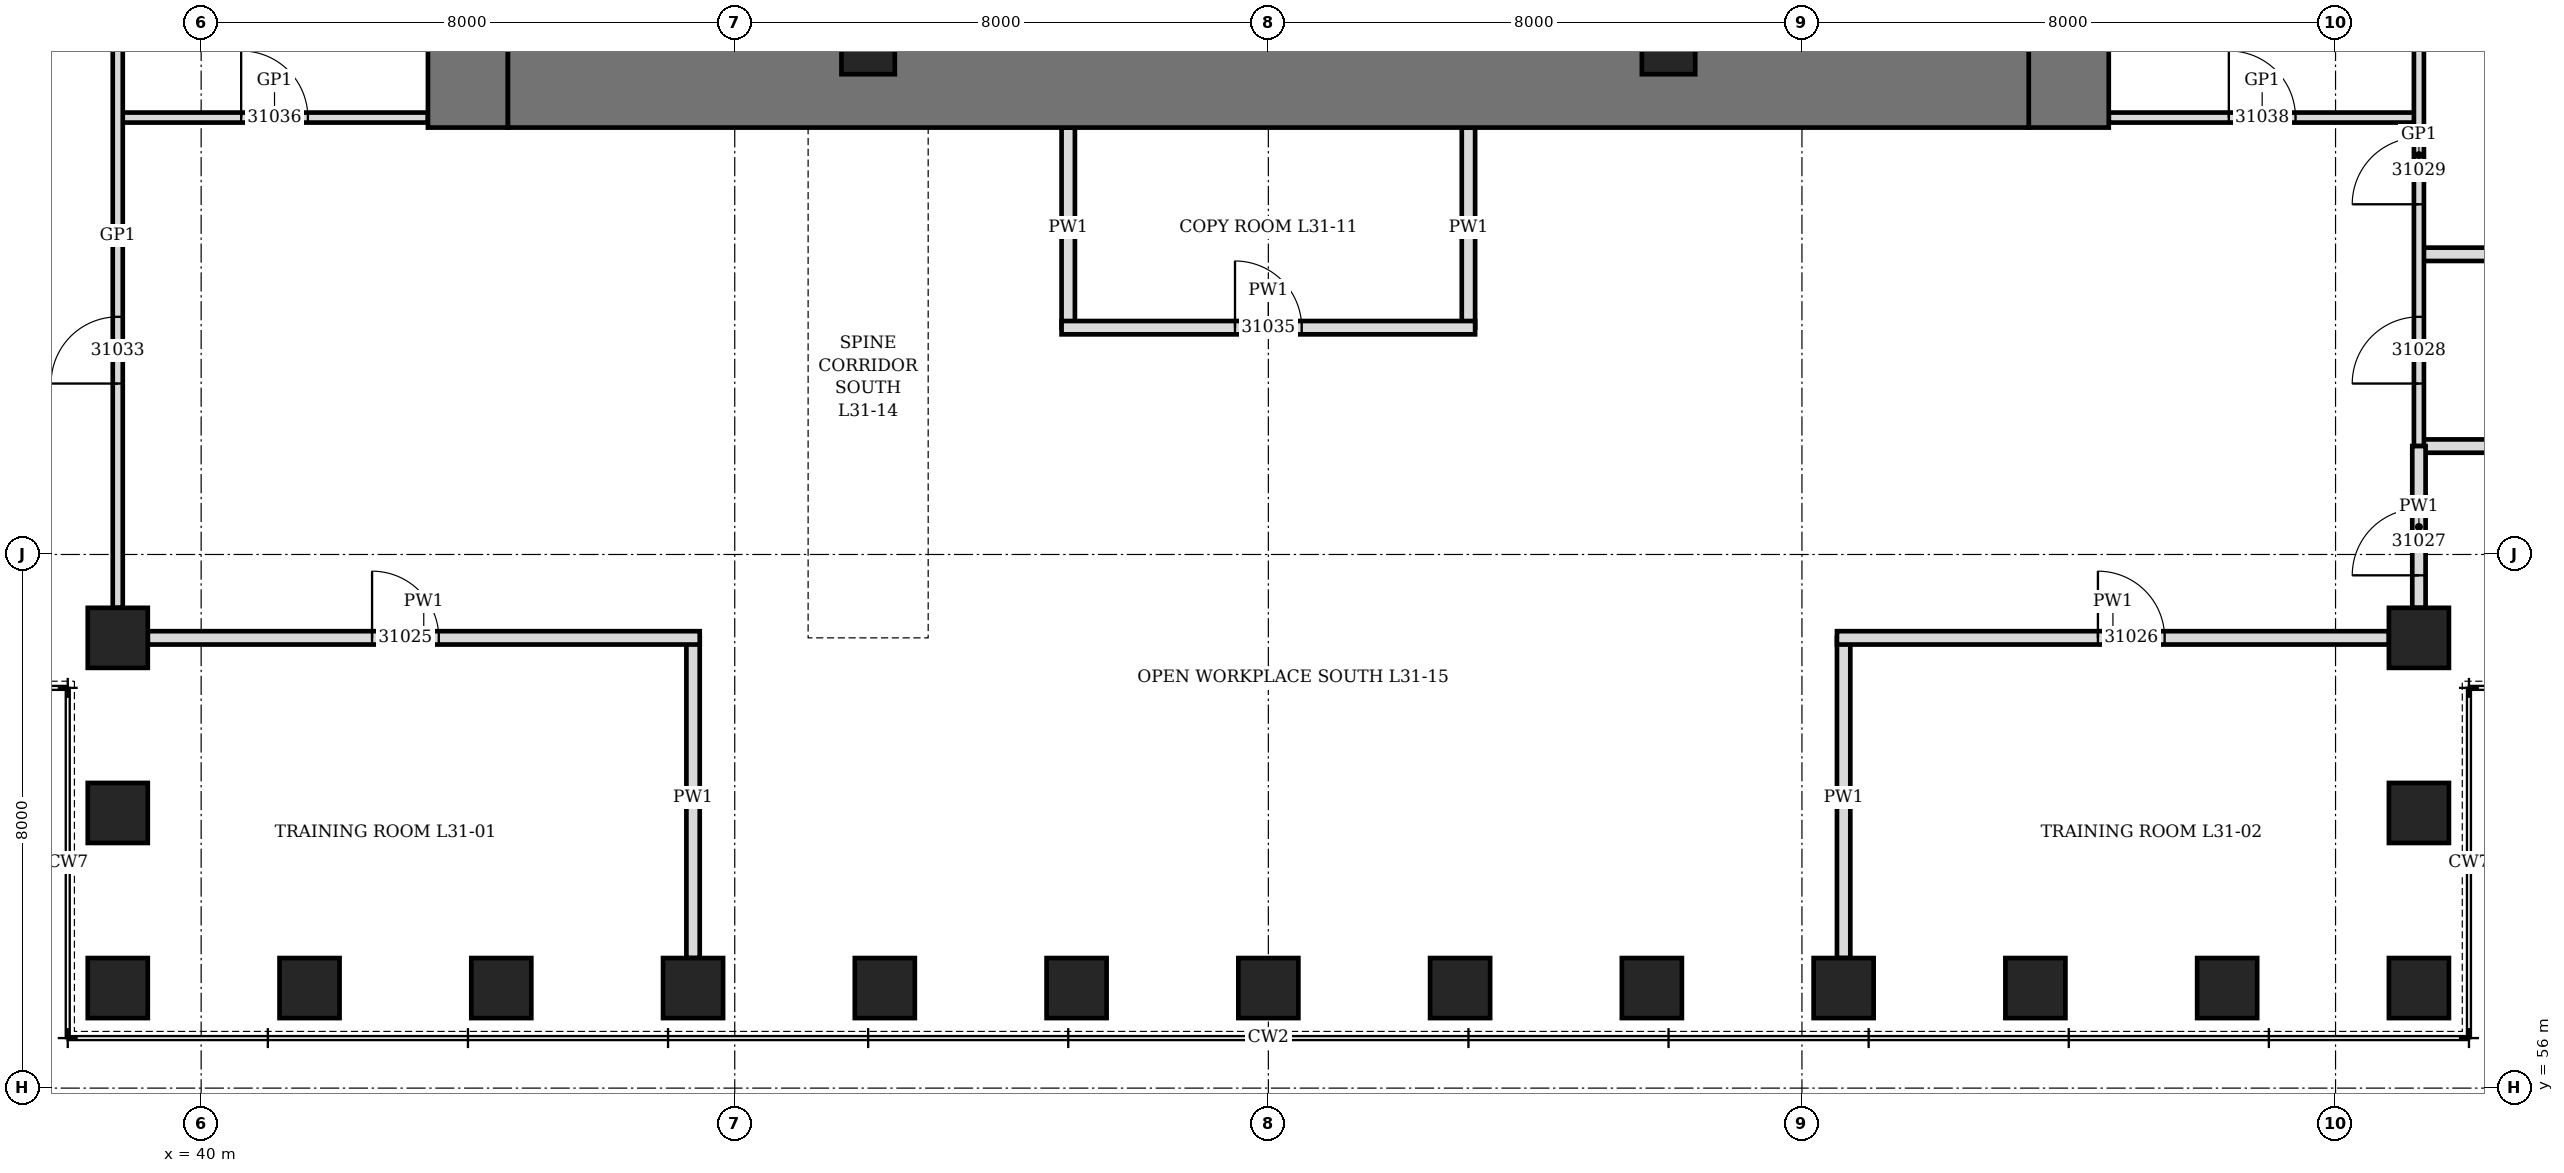
"""IFC4 building model, lengths in metres.
Left out: names, types, materials, properties, quantities, classifications, styles, units other than length and angle.
Written with IfcOpenShell. Run it as: python <this file> out.ifc"""

import sys

from ifc_helpers import new_model, si_unit, direction, frame, frame_2d, origin, origin_2d, place, context, subcontext, project, spatial, rectangle, hollow_rectangle, extrude, element, fill, save


model = new_model("IFC4")
c1 = context("Model", 3, precision=1e-05, world=origin(), true_north=direction((0.0, 1.0)))
c2 = subcontext(c1, "Body", "Model", "MODEL_VIEW")
j1 = project(units=[si_unit("LENGTHUNIT", "METRE"), si_unit("PLANEANGLEUNIT", "RADIAN")], contexts=[c1])
p1 = place(None, origin())
s1 = spatial("IfcSite", under=j1, at=p1, CompositionType="ELEMENT")
p2 = place(p1, origin())
s2 = spatial("IfcBuilding", under=s1, at=p2, CompositionType="ELEMENT")
p3 = place(p2, frame((0.0, 0.0, 141.7)))
s3 = spatial("IfcBuildingStorey", under=s2, at=p3, CompositionType="ELEMENT", Elevation=141.7)
for number, where, z_axis, x_axis in (
    (1, (38.75, 57.5, 0.0), (0.0, 0.0, 1.0), (1.0, 0.0, 0.0)),
    (2, (41.625, 57.5, 0.0), (0.0, 0.0, 1.0), (1.0, 0.0, 0.0)),
    (3, (44.5, 57.5, 0.0), (0.0, 0.0, 1.0), (1.0, 0.0, 0.0)),
    (4, (47.375, 57.5, 0.0), (0.0, 0.0, 1.0), (1.0, 0.0, 0.0)),
    (5, (50.25, 57.5, 0.0), (0.0, 0.0, 1.0), (1.0, 0.0, 0.0)),
    (6, (53.125, 57.5, 0.0), (0.0, 0.0, 1.0), (1.0, 0.0, 0.0)),
    (7, (56.0, 57.5, 0.0), (0.0, 0.0, 1.0), (1.0, 0.0, 0.0)),
    (8, (58.875, 57.5, 0.0), (0.0, 0.0, 1.0), (1.0, 0.0, 0.0)),
    (9, (61.75, 57.5, 0.0), (0.0, 0.0, 1.0), (1.0, 0.0, 0.0)),
    (10, (64.625, 57.5, 0.0), (0.0, 0.0, 1.0), (1.0, 0.0, 0.0)),
    (11, (67.5, 57.5, 0.0), (0.0, 0.0, 1.0), (1.0, 0.0, 0.0)),
    (12, (70.375, 57.5, 0.0), (0.0, 0.0, 1.0), (1.0, 0.0, 0.0)),
    (13, (73.25, 57.5, 0.0), (0.0, 0.0, 1.0), (0.0, 1.0, 0.0)),
    (14, (73.25, 60.125, 0.0), (0.0, 0.0, 1.0), (0.0, 1.0, 0.0)),
    (15, (73.25, 62.75, 0.0), (0.0, 0.0, 1.0), (1.0, 0.0, 0.0)),
    (16, (38.75, 62.75, 0.0), (0.0, 0.0, 1.0), (0.0, 1.0, 0.0)),
    (17, (38.75, 60.125, 0.0), (0.0, 0.0, 1.0), (0.0, 1.0, 0.0)),
):
    element("IfcColumn", number, at=place(p3, frame(where, z_axis=z_axis, x_axis=x_axis)), inside=s3, PredefinedType="COLUMN", context=c2, shape_type="SweptSolid", body=[
        extrude(hollow_rectangle(XDim=0.9, YDim=0.9, WallThickness=0.12, at=origin_2d()), origin(), (0.0, 0.0, 1.0), 4.2),
    ])
p4 = place(p3, frame((44.0, 70.4, 0.0), z_axis=(0.0, 0.0, 1.0), x_axis=(0.0, 1.0, 0.0)))
e18 = element("IfcWall", 18, at=p4, inside=s3, PredefinedType="SHEAR", context=c2, shape_type="SweptSolid", body=[
    extrude(rectangle(XDim=19.2, YDim=1.2, at=frame_2d((9.6, 0.0))), origin(), (0.0, 0.0, 1.0), 4.2),
])
p5 = place(p4, frame((8.6, 0.0, 0.0)))
e19 = element("IfcOpeningElement", 19, at=p5, cuts=e18, PredefinedType="OPENING", context=c2, shape_type="SweptSolid", body=[
    extrude(rectangle(XDim=2.0, YDim=2.4, at=frame_2d((1.0, 1.2))), frame((0.0, 0.61, 0.0), z_axis=(0.0, -1.0, 0.0), x_axis=(1.0, 0.0, 0.0)), (0.0, 0.0, 1.0), 1.22),
])
p6 = place(p3, frame((68.0, 70.4, 0.0), z_axis=(0.0, 0.0, 1.0), x_axis=(0.0, 1.0, 0.0)))
e20 = element("IfcWall", 20, at=p6, inside=s3, PredefinedType="SHEAR", context=c2, shape_type="SweptSolid", body=[
    extrude(rectangle(XDim=19.2, YDim=1.2, at=frame_2d((9.6, 0.0))), origin(), (0.0, 0.0, 1.0), 4.2),
])
p7 = place(p6, frame((8.6, 0.0, 0.0)))
e21 = element("IfcOpeningElement", 21, at=p7, cuts=e20, PredefinedType="OPENING", context=c2, shape_type="SweptSolid", body=[
    extrude(rectangle(XDim=2.0, YDim=2.4, at=frame_2d((1.0, 1.2))), frame((0.0, 0.61, 0.0), z_axis=(0.0, -1.0, 0.0), x_axis=(1.0, 0.0, 0.0)), (0.0, 0.0, 1.0), 1.22),
])
p8 = place(p3, frame((44.6, 71.0, 0.0), z_axis=(0.0, 0.0, 1.0), x_axis=(1.0, 0.0, 0.0)))
e22 = element("IfcWall", 22, at=p8, inside=s3, PredefinedType="SHEAR", context=c2, shape_type="SweptSolid", body=[
    extrude(rectangle(XDim=22.8, YDim=1.2, at=frame_2d((11.4, 0.0))), origin(), (0.0, 0.0, 1.0), 4.2),
])
for number, where, z_axis, x_axis in (
    (23, (50.0, 71.6, 0.0), (0.0, 0.0, 1.0), (1.0, 0.0, 0.0)),
    (24, (62.0, 71.6, 0.0), (0.0, 0.0, 1.0), (1.0, 0.0, 0.0)),
):
    element("IfcColumn", number, at=place(p3, frame(where, z_axis=z_axis, x_axis=x_axis)), inside=s3, PredefinedType="COLUMN", context=c2, shape_type="SweptSolid", body=[
        extrude(hollow_rectangle(XDim=0.8, YDim=0.8, WallThickness=0.1, at=origin_2d()), origin(), (0.0, 0.0, 1.0), 4.2),
    ])
for number, where, z_axis, x_axis in (
    (25, (47.375, 57.95, 0.0), (0.0, 0.0, 1.0), (0.0, 1.0, 0.0)),
    (26, (64.625, 57.95, 0.0), (0.0, 0.0, 1.0), (0.0, 1.0, 0.0)),
):
    element("IfcWall", number, at=place(p3, frame(where, z_axis=z_axis, x_axis=x_axis)), inside=s3, PredefinedType="PARTITIONING", context=c2, shape_type="SweptSolid", body=[
        extrude(rectangle(XDim=4.8, YDim=0.2, at=frame_2d((2.4, 0.0))), origin(), (0.0, 0.0, 1.0), 3.278),
    ])
for number, where, z_axis, x_axis in (
    (27, (73.25, 65.625, 0.0), (0.0, 0.0, 1.0), (1.0, 0.0, 0.0)),
    (28, (73.25, 68.5, 0.0), (0.0, 0.0, 1.0), (1.0, 0.0, 0.0)),
):
    element("IfcWall", number, at=place(p3, frame(where, z_axis=z_axis, x_axis=x_axis)), inside=s3, PredefinedType="PARTITIONING", context=c2, shape_type="SweptSolid", body=[
        extrude(rectangle(XDim=4.8, YDim=0.2, at=frame_2d((2.4, 0.0))), origin(), (0.0, 0.0, 1.0), 3.428),
    ])
for number, where, z_axis, x_axis in (
    (29, (53.0, 67.4, 0.0), (0.0, 0.0, 1.0), (0.0, 1.0, 0.0)),
    (30, (59.0, 67.4, 0.0), (0.0, 0.0, 1.0), (0.0, 1.0, 0.0)),
):
    element("IfcWall", number, at=place(p3, frame(where, z_axis=z_axis, x_axis=x_axis)), inside=s3, PredefinedType="PARTITIONING", context=c2, shape_type="SweptSolid", body=[
        extrude(rectangle(XDim=3.0, YDim=0.2, at=frame_2d((1.5, 0.0))), origin(), (0.0, 0.0, 1.0), 3.278),
    ])
p9 = place(p3, frame((39.2, 62.75, 0.0), z_axis=(0.0, 0.0, 1.0), x_axis=(1.0, 0.0, 0.0)))
e31 = element("IfcWall", 31, at=p9, inside=s3, PredefinedType="PARTITIONING", context=c2, shape_type="SweptSolid", body=[
    extrude(rectangle(XDim=8.275, YDim=0.2, at=frame_2d((4.138, 0.0))), origin(), (0.0, 0.0, 1.0), 4.04),
])
p10 = place(p9, frame((3.363, 0.0, 0.0)))
e32 = element("IfcOpeningElement", 32, at=p10, cuts=e31, PredefinedType="OPENING", context=c2, shape_type="SweptSolid", body=[
    extrude(rectangle(XDim=1.0, YDim=2.1, at=frame_2d((0.5, 1.05))), frame((0.0, 0.11, 0.0), z_axis=(0.0, -1.0, 0.0), x_axis=(1.0, 0.0, 0.0)), (0.0, 0.0, 1.0), 0.22),
])
p11 = place(p3, frame((64.525, 62.75, 0.0), z_axis=(0.0, 0.0, 1.0), x_axis=(1.0, 0.0, 0.0)))
e33 = element("IfcWall", 33, at=p11, inside=s3, PredefinedType="PARTITIONING", context=c2, shape_type="SweptSolid", body=[
    extrude(rectangle(XDim=8.275, YDim=0.2, at=frame_2d((4.138, 0.0))), origin(), (0.0, 0.0, 1.0), 4.04),
])
p12 = place(p11, frame((3.913, 0.0, 0.0)))
e34 = element("IfcOpeningElement", 34, at=p12, cuts=e33, PredefinedType="OPENING", context=c2, shape_type="SweptSolid", body=[
    extrude(rectangle(XDim=1.0, YDim=2.1, at=frame_2d((0.5, 1.05))), frame((0.0, 0.11, 0.0), z_axis=(0.0, -1.0, 0.0), x_axis=(1.0, 0.0, 0.0)), (0.0, 0.0, 1.0), 0.22),
])
p13 = place(p3, frame((52.9, 67.4, 0.0), z_axis=(0.0, 0.0, 1.0), x_axis=(1.0, 0.0, 0.0)))
e35 = element("IfcWall", 35, at=p13, inside=s3, PredefinedType="PARTITIONING", context=c2, shape_type="SweptSolid", body=[
    extrude(rectangle(XDim=6.2, YDim=0.2, at=frame_2d((3.1, 0.0))), origin(), (0.0, 0.0, 1.0), 4.04),
])
p14 = place(p13, frame((2.6, 0.0, 0.0)))
e36 = element("IfcOpeningElement", 36, at=p14, cuts=e35, PredefinedType="OPENING", context=c2, shape_type="SweptSolid", body=[
    extrude(rectangle(XDim=1.0, YDim=2.1, at=frame_2d((0.5, 1.05))), frame((0.0, 0.11, 0.0), z_axis=(0.0, -1.0, 0.0), x_axis=(1.0, 0.0, 0.0)), (0.0, 0.0, 1.0), 0.22),
])
p15 = place(p3, frame((38.8, 70.55, 0.0), z_axis=(0.0, 0.0, 1.0), x_axis=(1.0, 0.0, 0.0)))
e37 = element("IfcWall", 37, at=p15, inside=s3, PredefinedType="PARTITIONING", context=c2, shape_type="SweptSolid", body=[
    extrude(rectangle(XDim=4.6, YDim=0.15, at=frame_2d((2.3, 0.0))), origin(), (0.0, 0.0, 1.0), 4.04),
])
p16 = place(p15, frame((1.8, 0.0, 0.0)))
e38 = element("IfcOpeningElement", 38, at=p16, cuts=e37, PredefinedType="OPENING", context=c2, shape_type="SweptSolid", body=[
    extrude(rectangle(XDim=1.0, YDim=2.4, at=frame_2d((0.5, 1.2))), frame((0.0, 0.085, 0.0), z_axis=(0.0, -1.0, 0.0), x_axis=(1.0, 0.0, 0.0)), (0.0, 0.0, 1.0), 0.17),
])
p17 = place(p3, frame((68.6, 70.55, 0.0), z_axis=(0.0, 0.0, 1.0), x_axis=(1.0, 0.0, 0.0)))
e39 = element("IfcWall", 39, at=p17, inside=s3, PredefinedType="PARTITIONING", context=c2, shape_type="SweptSolid", body=[
    extrude(rectangle(XDim=4.6, YDim=0.15, at=frame_2d((2.3, 0.0))), origin(), (0.0, 0.0, 1.0), 4.04),
])
p18 = place(p17, frame((1.8, 0.0, 0.0)))
e40 = element("IfcOpeningElement", 40, at=p18, cuts=e39, PredefinedType="OPENING", context=c2, shape_type="SweptSolid", body=[
    extrude(rectangle(XDim=1.0, YDim=2.4, at=frame_2d((0.5, 1.2))), frame((0.0, 0.085, 0.0), z_axis=(0.0, -1.0, 0.0), x_axis=(1.0, 0.0, 0.0)), (0.0, 0.0, 1.0), 0.17),
])
p19 = place(p3, frame((38.75, 63.2, 0.0), z_axis=(0.0, 0.0, 1.0), x_axis=(0.0, 1.0, 0.0)))
e41 = element("IfcWall", 41, at=p19, inside=s3, PredefinedType="PARTITIONING", context=c2, shape_type="SweptSolid", body=[
    extrude(rectangle(XDim=11.15, YDim=0.15, at=frame_2d((5.575, 0.0))), origin(), (0.0, 0.0, 1.0), 4.04),
])
p20 = place(p19, frame((3.363, 0.0, 0.0)))
e42 = element("IfcOpeningElement", 42, at=p20, cuts=e41, PredefinedType="OPENING", context=c2, shape_type="SweptSolid", body=[
    extrude(rectangle(XDim=1.0, YDim=2.4, at=frame_2d((0.5, 1.2))), frame((0.0, 0.085, 0.0), z_axis=(0.0, -1.0, 0.0), x_axis=(1.0, 0.0, 0.0)), (0.0, 0.0, 1.0), 0.17),
])
p21 = place(p3, frame((73.25, 65.625, 0.0), z_axis=(0.0, 0.0, 1.0), x_axis=(0.0, 1.0, 0.0)))
e43 = element("IfcWall", 43, at=p21, inside=s3, PredefinedType="PARTITIONING", context=c2, shape_type="SweptSolid", body=[
    extrude(rectangle(XDim=8.725, YDim=0.15, at=frame_2d((4.363, 0.0))), origin(), (0.0, 0.0, 1.0), 4.04),
])
p22 = place(p21, frame((0.938, 0.0, 0.0)))
e44 = element("IfcOpeningElement", 44, at=p22, cuts=e43, PredefinedType="OPENING", context=c2, shape_type="SweptSolid", body=[
    extrude(rectangle(XDim=1.0, YDim=2.4, at=frame_2d((0.5, 1.2))), frame((0.0, 0.085, 0.0), z_axis=(0.0, -1.0, 0.0), x_axis=(1.0, 0.0, 0.0)), (0.0, 0.0, 1.0), 0.17),
])
p23 = place(p21, frame((3.625, 0.0, 0.0)))
e45 = element("IfcOpeningElement", 45, at=p23, cuts=e43, PredefinedType="OPENING", context=c2, shape_type="SweptSolid", body=[
    extrude(rectangle(XDim=1.0, YDim=2.1, at=frame_2d((0.5, 1.05))), frame((0.0, 0.085, 0.0), z_axis=(0.0, -1.0, 0.0), x_axis=(1.0, 0.0, 0.0)), (0.0, 0.0, 1.0), 0.17),
])
p24 = place(p3, frame((73.25, 63.2, 0.0), z_axis=(0.0, 0.0, 1.0), x_axis=(0.0, 1.0, 0.0)))
e46 = element("IfcWall", 46, at=p24, inside=s3, PredefinedType="PARTITIONING", context=c2, shape_type="SweptSolid", body=[
    extrude(rectangle(XDim=2.425, YDim=0.2, at=frame_2d((1.212, 0.0))), origin(), (0.0, 0.0, 1.0), 4.04),
])
p25 = place(p24, frame((0.488, 0.0, 0.0)))
e47 = element("IfcOpeningElement", 47, at=p25, cuts=e46, PredefinedType="OPENING", context=c2, shape_type="SweptSolid", body=[
    extrude(rectangle(XDim=1.0, YDim=2.1, at=frame_2d((0.5, 1.05))), frame((0.0, 0.11, 0.0), z_axis=(0.0, -1.0, 0.0), x_axis=(1.0, 0.0, 0.0)), (0.0, 0.0, 1.0), 0.22),
])
p26 = place(p10, origin())
e48 = element("IfcDoor", 48, at=p26, inside=s3, OperationType="SINGLE_SWING_LEFT", PredefinedType="DOOR", context=c2, shape_type="SweptSolid", body=[
    extrude(rectangle(XDim=1.0, YDim=2.1, at=frame_2d((0.5, 1.05))), frame((0.0, 0.1, 0.0), z_axis=(0.0, -1.0, 0.0), x_axis=(1.0, 0.0, 0.0)), (0.0, 0.0, 1.0), 0.199),
])
fill(e32, e48)
p27 = place(p12, origin())
e49 = element("IfcDoor", 49, at=p27, inside=s3, OperationType="SINGLE_SWING_LEFT", PredefinedType="DOOR", context=c2, shape_type="SweptSolid", body=[
    extrude(rectangle(XDim=1.0, YDim=2.1, at=frame_2d((0.5, 1.05))), frame((0.0, 0.1, 0.0), z_axis=(0.0, -1.0, 0.0), x_axis=(1.0, 0.0, 0.0)), (0.0, 0.0, 1.0), 0.199),
])
fill(e34, e49)
p28 = place(p25, origin())
e50 = element("IfcDoor", 50, at=p28, inside=s3, OperationType="SINGLE_SWING_LEFT", PredefinedType="DOOR", context=c2, shape_type="SweptSolid", body=[
    extrude(rectangle(XDim=1.0, YDim=2.1, at=frame_2d((0.5, 1.05))), frame((0.0, 0.1, 0.0), z_axis=(0.0, -1.0, 0.0), x_axis=(1.0, 0.0, 0.0)), (0.0, 0.0, 1.0), 0.199),
])
fill(e47, e50)
p29 = place(p22, origin())
e51 = element("IfcDoor", 51, at=p29, inside=s3, OperationType="SINGLE_SWING_RIGHT", PredefinedType="DOOR", context=c2, shape_type="SweptSolid", body=[
    extrude(rectangle(XDim=1.0, YDim=2.4, at=frame_2d((0.5, 1.2))), frame((0.0, 0.075, 0.0), z_axis=(0.0, -1.0, 0.0), x_axis=(1.0, 0.0, 0.0)), (0.0, 0.0, 1.0), 0.149),
])
fill(e44, e51)
p30 = place(p23, origin())
e52 = element("IfcDoor", 52, at=p30, inside=s3, OperationType="SINGLE_SWING_LEFT", PredefinedType="DOOR", context=c2, shape_type="SweptSolid", body=[
    extrude(rectangle(XDim=1.0, YDim=2.1, at=frame_2d((0.5, 1.05))), frame((0.0, 0.075, 0.0), z_axis=(0.0, -1.0, 0.0), x_axis=(1.0, 0.0, 0.0)), (0.0, 0.0, 1.0), 0.149),
])
fill(e45, e52)
p31 = place(p20, origin())
e53 = element("IfcDoor", 53, at=p31, inside=s3, OperationType="SINGLE_SWING_RIGHT", PredefinedType="DOOR", context=c2, shape_type="SweptSolid", body=[
    extrude(rectangle(XDim=1.0, YDim=2.4, at=frame_2d((0.5, 1.2))), frame((0.0, 0.075, 0.0), z_axis=(0.0, -1.0, 0.0), x_axis=(1.0, 0.0, 0.0)), (0.0, 0.0, 1.0), 0.149),
])
fill(e42, e53)
p32 = place(p14, origin())
e54 = element("IfcDoor", 54, at=p32, inside=s3, OperationType="SINGLE_SWING_LEFT", PredefinedType="DOOR", context=c2, shape_type="SweptSolid", body=[
    extrude(rectangle(XDim=1.0, YDim=2.1, at=frame_2d((0.5, 1.05))), frame((0.0, 0.1, 0.0), z_axis=(0.0, -1.0, 0.0), x_axis=(1.0, 0.0, 0.0)), (0.0, 0.0, 1.0), 0.199),
])
fill(e36, e54)
p33 = place(p16, origin())
e55 = element("IfcDoor", 55, at=p33, inside=s3, OperationType="SINGLE_SWING_RIGHT", PredefinedType="DOOR", context=c2, shape_type="SweptSolid", body=[
    extrude(rectangle(XDim=1.0, YDim=2.4, at=frame_2d((0.5, 1.2))), frame((0.0, 0.075, 0.0), z_axis=(0.0, -1.0, 0.0), x_axis=(1.0, 0.0, 0.0)), (0.0, 0.0, 1.0), 0.149),
])
fill(e38, e55)
p34 = place(p18, origin())
e56 = element("IfcDoor", 56, at=p34, inside=s3, OperationType="SINGLE_SWING_RIGHT", PredefinedType="DOOR", context=c2, shape_type="SweptSolid", body=[
    extrude(rectangle(XDim=1.0, YDim=2.4, at=frame_2d((0.5, 1.2))), frame((0.0, 0.075, 0.0), z_axis=(0.0, -1.0, 0.0), x_axis=(1.0, 0.0, 0.0)), (0.0, 0.0, 1.0), 0.149),
])
fill(e40, e56)
save(model, sys.argv[1])
